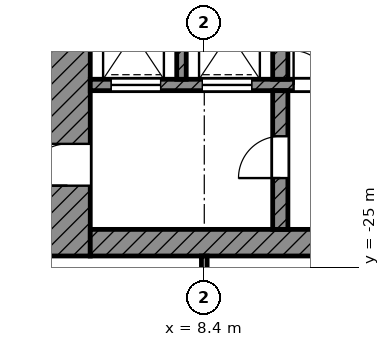
"""IFC4 building model, lengths in metres.
Left out: names, types, materials, properties, quantities, classifications, styles, units other than length and angle.
Written with IfcOpenShell. Run it as: python <this file> out.ifc"""

import sys

from ifc_helpers import new_model, si_unit, direction, frame, frame_2d, origin, place, context, subcontext, project, spatial, rectangle, extrude, element, fill, save


model = new_model("IFC4")
c1 = context("Model", 3, precision=1e-05, world=origin(), true_north=direction((0.0, 1.0)))
c2 = subcontext(c1, "Body", "Model", "MODEL_VIEW")
j1 = project(units=[si_unit("LENGTHUNIT", "METRE"), si_unit("PLANEANGLEUNIT", "RADIAN")], contexts=[c1])
p1 = place(None, origin())
s1 = spatial("IfcSite", under=j1, at=p1, CompositionType="ELEMENT")
p2 = place(p1, origin())
s2 = spatial("IfcBuilding", under=s1, at=p2, CompositionType="ELEMENT")
p3 = place(p2, frame((0.0, 0.0, 277.6)))
s3 = spatial("IfcBuildingStorey", under=s2, at=p3, CompositionType="ELEMENT", Elevation=277.6)
p4 = place(p3, frame((4.8, -24.7, 0.0), z_axis=(0.0, 0.0, 1.0), x_axis=(0.0, 1.0, 0.0)))
e1 = element("IfcWall", 1, at=p4, inside=s3, PredefinedType="SHEAR", context=c2, shape_type="SweptSolid", body=[
    extrude(rectangle(XDim=19.3, YDim=1.2, at=frame_2d((9.65, 0.0))), origin(), (0.0, 0.0, 1.0), 3.6),
])
p5 = place(p4, frame((11.15, 0.0, 0.0)))
e2 = element("IfcOpeningElement", 2, at=p5, cuts=e1, PredefinedType="OPENING", context=c2, shape_type="SweptSolid", body=[
    extrude(rectangle(XDim=1.1, YDim=2.1, at=frame_2d((0.55, 1.05))), frame((0.0, 0.61, 0.0), z_axis=(0.0, -1.0, 0.0), x_axis=(1.0, 0.0, 0.0)), (0.0, 0.0, 1.0), 1.22),
])
p6 = place(p4, frame((1.85, 0.0, 0.0)))
e3 = element("IfcOpeningElement", 3, at=p6, cuts=e1, PredefinedType="OPENING", context=c2, shape_type="SweptSolid", body=[
    extrude(rectangle(XDim=1.1, YDim=2.1, at=frame_2d((0.55, 1.05))), frame((0.0, 0.61, 0.0), z_axis=(0.0, -1.0, 0.0), x_axis=(1.0, 0.0, 0.0)), (0.0, 0.0, 1.0), 1.22),
])
p7 = place(p3, frame((5.4, -24.35, 0.0), z_axis=(0.0, 0.0, 1.0), x_axis=(1.0, 0.0, 0.0)))
e4 = element("IfcWall", 4, at=p7, inside=s3, PredefinedType="SHEAR", context=c2, shape_type="SweptSolid", body=[
    extrude(rectangle(XDim=18.6, YDim=0.7, at=frame_2d((9.3, 0.0))), origin(), (0.0, 0.0, 1.0), 3.6),
])
p8 = place(p7, frame((6.3, 0.0, 0.0)))
e5 = element("IfcOpeningElement", 5, at=p8, cuts=e4, PredefinedType="OPENING", context=c2, shape_type="SweptSolid", body=[
    extrude(rectangle(XDim=1.8, YDim=2.1, at=frame_2d((0.9, 1.05))), frame((0.0, 0.36, 0.0), z_axis=(0.0, -1.0, 0.0), x_axis=(1.0, 0.0, 0.0)), (0.0, 0.0, 1.0), 0.72),
])
p9 = place(p3, frame((5.4, -20.2, 0.0), z_axis=(0.0, 0.0, 1.0), x_axis=(1.0, 0.0, 0.0)))
e6 = element("IfcWall", 6, at=p9, inside=s3, PredefinedType="SHEAR", context=c2, shape_type="SweptSolid", body=[
    extrude(rectangle(XDim=14.65, YDim=0.3, at=frame_2d((7.325, 0.0))), origin(), (0.0, 0.0, 1.0), 3.6),
])
p10 = place(p9, frame((10.55, 0.0, 0.0)))
e7 = element("IfcOpeningElement", 7, at=p10, cuts=e6, PredefinedType="OPENING", context=c2, shape_type="SweptSolid", body=[
    extrude(rectangle(XDim=1.3, YDim=2.1, at=frame_2d((0.65, 1.05))), frame((0.0, 0.16, 0.0), z_axis=(0.0, -1.0, 0.0), x_axis=(1.0, 0.0, 0.0)), (0.0, 0.0, 1.0), 0.32),
])
p11 = place(p9, frame((12.95, 0.0, 0.0)))
e8 = element("IfcOpeningElement", 8, at=p11, cuts=e6, PredefinedType="OPENING", context=c2, shape_type="SweptSolid", body=[
    extrude(rectangle(XDim=1.3, YDim=2.1, at=frame_2d((0.65, 1.05))), frame((0.0, 0.16, 0.0), z_axis=(0.0, -1.0, 0.0), x_axis=(1.0, 0.0, 0.0)), (0.0, 0.0, 1.0), 0.32),
])
p12 = place(p9, frame((0.55, 0.0, 0.0)))
e9 = element("IfcOpeningElement", 9, at=p12, cuts=e6, PredefinedType="OPENING", context=c2, shape_type="SweptSolid", body=[
    extrude(rectangle(XDim=1.3, YDim=2.1, at=frame_2d((0.65, 1.05))), frame((0.0, 0.16, 0.0), z_axis=(0.0, -1.0, 0.0), x_axis=(1.0, 0.0, 0.0)), (0.0, 0.0, 1.0), 0.32),
])
p13 = place(p9, frame((2.95, 0.0, 0.0)))
e10 = element("IfcOpeningElement", 10, at=p13, cuts=e6, PredefinedType="OPENING", context=c2, shape_type="SweptSolid", body=[
    extrude(rectangle(XDim=1.3, YDim=2.1, at=frame_2d((0.65, 1.05))), frame((0.0, 0.16, 0.0), z_axis=(0.0, -1.0, 0.0), x_axis=(1.0, 0.0, 0.0)), (0.0, 0.0, 1.0), 0.32),
])
p14 = place(p9, frame((5.35, 0.0, 0.0)))
e11 = element("IfcOpeningElement", 11, at=p14, cuts=e6, PredefinedType="OPENING", context=c2, shape_type="SweptSolid", body=[
    extrude(rectangle(XDim=0.9, YDim=2.1, at=frame_2d((0.45, 1.05))), frame((0.0, 0.16, 0.0), z_axis=(0.0, -1.0, 0.0), x_axis=(1.0, 0.0, 0.0)), (0.0, 0.0, 1.0), 0.32),
])
p15 = place(p9, frame((7.75, 0.0, 0.0)))
e12 = element("IfcOpeningElement", 12, at=p15, cuts=e6, PredefinedType="OPENING", context=c2, shape_type="SweptSolid", body=[
    extrude(rectangle(XDim=0.9, YDim=2.1, at=frame_2d((0.45, 1.05))), frame((0.0, 0.16, 0.0), z_axis=(0.0, -1.0, 0.0), x_axis=(1.0, 0.0, 0.0)), (0.0, 0.0, 1.0), 0.32),
])
p16 = place(p3, frame((10.4, -24.0, 0.0), z_axis=(0.0, 0.0, 1.0), x_axis=(0.0, 1.0, 0.0)))
e13 = element("IfcWall", 13, at=p16, inside=s3, PredefinedType="SHEAR", context=c2, shape_type="SweptSolid", body=[
    extrude(rectangle(XDim=3.65, YDim=0.4, at=frame_2d((1.825, 0.0))), origin(), (0.0, 0.0, 1.0), 3.6),
])
p17 = place(p16, frame((1.35, 0.0, 0.0)))
e14 = element("IfcOpeningElement", 14, at=p17, cuts=e13, PredefinedType="OPENING", context=c2, shape_type="SweptSolid", body=[
    extrude(rectangle(XDim=1.1, YDim=2.1, at=frame_2d((0.55, 1.05))), frame((0.0, 0.21, 0.0), z_axis=(0.0, -1.0, 0.0), x_axis=(1.0, 0.0, 0.0)), (0.0, 0.0, 1.0), 0.42),
])
p18 = place(p3, frame((10.4, -20.05, 0.0), z_axis=(0.0, 0.0, 1.0), x_axis=(0.0, 1.0, 0.0)))
e15 = element("IfcWall", 15, at=p18, inside=s3, PredefinedType="SHEAR", context=c2, shape_type="SweptSolid", body=[
    extrude(rectangle(XDim=3.15, YDim=0.4, at=frame_2d((1.575, 0.0))), origin(), (0.0, 0.0, 1.0), 3.6),
])
p19 = place(p3, frame((7.8, -20.05, 0.0), z_axis=(0.0, 0.0, 1.0), x_axis=(0.0, 1.0, 0.0)))
e16 = element("IfcWall", 16, at=p19, inside=s3, PredefinedType="SHEAR", context=c2, shape_type="SweptSolid", body=[
    extrude(rectangle(XDim=3.15, YDim=0.25, at=frame_2d((1.575, 0.0))), origin(), (0.0, 0.0, 1.0), 3.6),
])
p20 = place(p3, frame((8.4, -31.957, 0.0), z_axis=(0.0, 0.0, 1.0), x_axis=(0.0, 1.0, 0.0)))
e17 = element("IfcWall", 17, at=p20, inside=s3, PredefinedType="PARTITIONING", context=c2, shape_type="SweptSolid", body=[
    extrude(rectangle(XDim=7.257, YDim=0.15, at=frame_2d((3.628, 0.0))), origin(), (0.0, 0.0, 1.0), 3.6),
])
p21 = place(p20, frame((4.207, 0.0, 0.0)))
e18 = element("IfcOpeningElement", 18, at=p21, cuts=e17, PredefinedType="OPENING", context=c2, shape_type="SweptSolid", body=[
    extrude(rectangle(XDim=0.9, YDim=2.1, at=frame_2d((0.45, 1.05))), frame((0.0, 0.085, 0.0), z_axis=(0.0, -1.0, 0.0), x_axis=(1.0, 0.0, 0.0)), (0.0, 0.0, 1.0), 0.17),
])
p22 = place(p12, origin())
e19 = element("IfcDoor", 19, at=p22, inside=s3, OperationType="DOUBLE_DOOR_SLIDING", PredefinedType="DOOR", context=c2, shape_type="SweptSolid", body=[
    extrude(rectangle(XDim=1.3, YDim=2.1, at=frame_2d((0.65, 1.05))), frame((0.0, 0.025, 0.0), z_axis=(0.0, -1.0, 0.0), x_axis=(1.0, 0.0, 0.0)), (0.0, 0.0, 1.0), 0.05),
])
fill(e9, e19)
p23 = place(p13, origin())
e20 = element("IfcDoor", 20, at=p23, inside=s3, OperationType="DOUBLE_DOOR_SLIDING", PredefinedType="DOOR", context=c2, shape_type="SweptSolid", body=[
    extrude(rectangle(XDim=1.3, YDim=2.1, at=frame_2d((0.65, 1.05))), frame((0.0, 0.025, 0.0), z_axis=(0.0, -1.0, 0.0), x_axis=(1.0, 0.0, 0.0)), (0.0, 0.0, 1.0), 0.05),
])
fill(e10, e20)
p24 = place(p6, origin())
e21 = element("IfcDoor", 21, at=p24, inside=s3, OperationType="SINGLE_SWING_LEFT", PredefinedType="DOOR", context=c2, shape_type="SweptSolid", body=[
    extrude(rectangle(XDim=1.1, YDim=2.1, at=frame_2d((0.55, 1.05))), frame((0.0, 0.025, 0.0), z_axis=(0.0, -1.0, 0.0), x_axis=(1.0, 0.0, 0.0)), (0.0, 0.0, 1.0), 0.05),
])
fill(e3, e21)
p25 = place(p17, origin())
e22 = element("IfcDoor", 22, at=p25, inside=s3, OperationType="SINGLE_SWING_LEFT", PredefinedType="DOOR", context=c2, shape_type="SweptSolid", body=[
    extrude(rectangle(XDim=1.1, YDim=2.1, at=frame_2d((0.55, 1.05))), frame((0.0, 0.025, 0.0), z_axis=(0.0, -1.0, 0.0), x_axis=(1.0, 0.0, 0.0)), (0.0, 0.0, 1.0), 0.05),
])
fill(e14, e22)
p26 = place(p14, origin())
e23 = element("IfcDoor", 23, at=p26, inside=s3, OperationType="SINGLE_SWING_LEFT", PredefinedType="DOOR", context=c2, shape_type="SweptSolid", body=[
    extrude(rectangle(XDim=0.9, YDim=2.1, at=frame_2d((0.45, 1.05))), frame((0.0, 0.025, 0.0), z_axis=(0.0, -1.0, 0.0), x_axis=(1.0, 0.0, 0.0)), (0.0, 0.0, 1.0), 0.05),
])
fill(e11, e23)
save(model, sys.argv[1])
